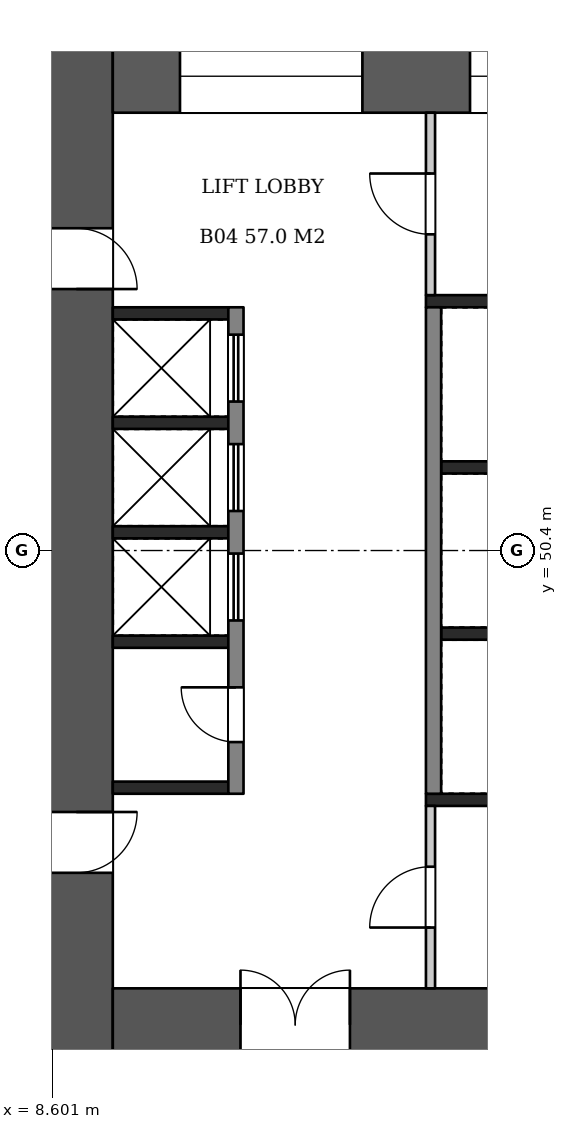
"""IFC4 building model, lengths in metres.
Left out: names, types, materials, properties, quantities, classifications, styles, units other than length and angle.
Written with IfcOpenShell. Run it as: python <this file> out.ifc"""

import sys

from ifc_helpers import new_model, si_unit, direction, frame, frame_2d, origin, place, context, subcontext, project, spatial, rectangle, extrude, element, fill, save


model = new_model("IFC4")
c1 = context("Model", 3, precision=1e-05, world=origin(), true_north=direction((0.0, 1.0)))
c2 = subcontext(c1, "Body", "Model", "MODEL_VIEW")
j1 = project(units=[si_unit("LENGTHUNIT", "METRE"), si_unit("PLANEANGLEUNIT", "RADIAN")], contexts=[c1])
p1 = place(None, origin())
s1 = spatial("IfcSite", under=j1, at=p1, CompositionType="ELEMENT")
p2 = place(p1, origin())
s2 = spatial("IfcBuilding", under=s1, at=p2, CompositionType="ELEMENT")
p3 = place(p2, frame((0.0, 0.0, 25.2)))
s3 = spatial("IfcBuildingStorey", under=s2, at=p3, CompositionType="ELEMENT", Elevation=25.2)
p4 = place(p3, frame((9.0, 58.8, 0.0), z_axis=(0.0, 0.0, 1.0), x_axis=(0.0, -1.0, 0.0)))
e1 = element("IfcWall", 1, at=p4, inside=s3, PredefinedType="SHEAR", context=c2, shape_type="SweptSolid", body=[
    extrude(rectangle(XDim=16.8, YDim=1.2, at=frame_2d((8.4, 0.0))), origin(), (0.0, 0.0, 1.0), 3.22),
])
p5 = place(p4, frame((3.1, 0.0, 0.0)))
e2 = element("IfcOpeningElement", 2, at=p5, cuts=e1, PredefinedType="OPENING", context=c2, shape_type="SweptSolid", body=[
    extrude(rectangle(XDim=1.0, YDim=2.1, at=frame_2d((0.5, 1.05))), frame((0.0, 0.61, 0.0), z_axis=(0.0, -1.0, 0.0), x_axis=(1.0, 0.0, 0.0)), (0.0, 0.0, 1.0), 1.22),
])
p6 = place(p4, frame((12.7, 0.0, 0.0)))
e3 = element("IfcOpeningElement", 3, at=p6, cuts=e1, PredefinedType="OPENING", context=c2, shape_type="SweptSolid", body=[
    extrude(rectangle(XDim=1.0, YDim=2.1, at=frame_2d((0.5, 1.05))), frame((0.0, 0.61, 0.0), z_axis=(0.0, -1.0, 0.0), x_axis=(1.0, 0.0, 0.0)), (0.0, 0.0, 1.0), 1.22),
])
p7 = place(p3, frame((9.6, 58.2, 0.0), z_axis=(0.0, 0.0, 1.0), x_axis=(1.0, 0.0, 0.0)))
e4 = element("IfcWall", 4, at=p7, inside=s3, PredefinedType="SHEAR", context=c2, shape_type="SweptSolid", body=[
    extrude(rectangle(XDim=14.4, YDim=1.2, at=frame_2d((7.2, 0.0))), origin(), (0.0, 0.0, 1.0), 3.22),
])
p8 = place(p7, frame((1.105, 0.0, 0.6)))
e5 = element("IfcOpeningElement", 5, at=p8, cuts=e4, PredefinedType="OPENING", context=c2, shape_type="SweptSolid", body=[
    extrude(rectangle(XDim=3.0, YDim=2.1, at=frame_2d((1.5, 1.05))), frame((0.0, 0.61, 0.0), z_axis=(0.0, -1.0, 0.0), x_axis=(1.0, 0.0, 0.0)), (0.0, 0.0, 1.0), 1.22),
])
p9 = place(p7, frame((5.875, 0.0, 0.6)))
e6 = element("IfcOpeningElement", 6, at=p9, cuts=e4, PredefinedType="OPENING", context=c2, shape_type="SweptSolid", body=[
    extrude(rectangle(XDim=2.4, YDim=2.1, at=frame_2d((1.2, 1.05))), frame((0.0, 0.61, 0.0), z_axis=(0.0, -1.0, 0.0), x_axis=(1.0, 0.0, 0.0)), (0.0, 0.0, 1.0), 1.22),
])
p10 = place(p7, frame((9.993, 0.0, 0.5)))
e7 = element("IfcOpeningElement", 7, at=p10, cuts=e4, PredefinedType="OPENING", context=c2, shape_type="SweptSolid", body=[
    extrude(rectangle(XDim=1.2, YDim=2.4, at=frame_2d((0.6, 1.2))), frame((0.0, 0.61, 0.0), z_axis=(0.0, -1.0, 0.0), x_axis=(1.0, 0.0, 0.0)), (0.0, 0.0, 1.0), 1.22),
])
p11 = place(p7, frame((12.197, 0.0, 0.5)))
e8 = element("IfcOpeningElement", 8, at=p11, cuts=e4, PredefinedType="OPENING", context=c2, shape_type="SweptSolid", body=[
    extrude(rectangle(XDim=1.2, YDim=2.4, at=frame_2d((0.6, 1.2))), frame((0.0, 0.61, 0.0), z_axis=(0.0, -1.0, 0.0), x_axis=(1.0, 0.0, 0.0)), (0.0, 0.0, 1.0), 1.22),
])
p12 = place(p3, frame((9.6, 42.6, 0.0), z_axis=(0.0, 0.0, 1.0), x_axis=(1.0, 0.0, 0.0)))
e9 = element("IfcWall", 9, at=p12, inside=s3, PredefinedType="SHEAR", context=c2, shape_type="SweptSolid", body=[
    extrude(rectangle(XDim=14.4, YDim=1.2, at=frame_2d((7.2, 0.0))), origin(), (0.0, 0.0, 1.0), 3.22),
])
p13 = place(p12, frame((2.1, 0.0, 0.0)))
e10 = element("IfcOpeningElement", 10, at=p13, cuts=e9, PredefinedType="OPENING", context=c2, shape_type="SweptSolid", body=[
    extrude(rectangle(XDim=1.8, YDim=2.1, at=frame_2d((0.9, 1.05))), frame((0.0, 0.61, 0.0), z_axis=(0.0, -1.0, 0.0), x_axis=(1.0, 0.0, 0.0)), (0.0, 0.0, 1.0), 1.22),
])
for number, where, z_axis, x_axis in (
    (11, (9.6, 54.3, 0.0), (0.0, 0.0, 1.0), (1.0, 0.0, 0.0)),
    (12, (9.6, 52.5, 0.0), (0.0, 0.0, 1.0), (1.0, 0.0, 0.0)),
    (13, (9.6, 50.7, 0.0), (0.0, 0.0, 1.0), (1.0, 0.0, 0.0)),
    (14, (9.6, 48.9, 0.0), (0.0, 0.0, 1.0), (1.0, 0.0, 0.0)),
    (15, (9.6, 46.5, 0.0), (0.0, 0.0, 1.0), (1.0, 0.0, 0.0)),
):
    element("IfcWall", number, at=place(p3, frame(where, z_axis=z_axis, x_axis=x_axis)), inside=s3, PredefinedType="SHEAR", context=c2, shape_type="SweptSolid", body=[
        extrude(rectangle(XDim=1.9, YDim=0.2, at=frame_2d((0.95, 0.0))), origin(), (0.0, 0.0, 1.0), 3.22),
    ])
p14 = place(p3, frame((11.625, 54.4, 0.0), z_axis=(0.0, 0.0, 1.0), x_axis=(0.0, -1.0, 0.0)))
e16 = element("IfcWall", 16, at=p14, inside=s3, PredefinedType="SHEAR", context=c2, shape_type="SweptSolid", body=[
    extrude(rectangle(XDim=8.0, YDim=0.25, at=frame_2d((4.0, 0.0))), origin(), (0.0, 0.0, 1.0), 3.22),
])
p15 = place(p14, frame((0.45, 0.0, 0.0)))
e17 = element("IfcOpeningElement", 17, at=p15, cuts=e16, PredefinedType="OPENING", context=c2, shape_type="SweptSolid", body=[
    extrude(rectangle(XDim=1.1, YDim=2.1, at=frame_2d((0.55, 1.05))), frame((0.0, 0.135, 0.0), z_axis=(0.0, -1.0, 0.0), x_axis=(1.0, 0.0, 0.0)), (0.0, 0.0, 1.0), 0.27),
])
p16 = place(p14, frame((2.25, 0.0, 0.0)))
e18 = element("IfcOpeningElement", 18, at=p16, cuts=e16, PredefinedType="OPENING", context=c2, shape_type="SweptSolid", body=[
    extrude(rectangle(XDim=1.1, YDim=2.1, at=frame_2d((0.55, 1.05))), frame((0.0, 0.135, 0.0), z_axis=(0.0, -1.0, 0.0), x_axis=(1.0, 0.0, 0.0)), (0.0, 0.0, 1.0), 0.27),
])
p17 = place(p14, frame((4.05, 0.0, 0.0)))
e19 = element("IfcOpeningElement", 19, at=p17, cuts=e16, PredefinedType="OPENING", context=c2, shape_type="SweptSolid", body=[
    extrude(rectangle(XDim=1.1, YDim=2.1, at=frame_2d((0.55, 1.05))), frame((0.0, 0.135, 0.0), z_axis=(0.0, -1.0, 0.0), x_axis=(1.0, 0.0, 0.0)), (0.0, 0.0, 1.0), 0.27),
])
p18 = place(p14, frame((6.25, 0.0, 0.0)))
e20 = element("IfcOpeningElement", 20, at=p18, cuts=e16, PredefinedType="OPENING", context=c2, shape_type="SweptSolid", body=[
    extrude(rectangle(XDim=0.9, YDim=2.1, at=frame_2d((0.45, 1.05))), frame((0.0, 0.135, 0.0), z_axis=(0.0, -1.0, 0.0), x_axis=(1.0, 0.0, 0.0)), (0.0, 0.0, 1.0), 0.27),
])
for number, where, z_axis, x_axis in (
    (21, (15.0, 51.767, 0.0), (0.0, 0.0, 1.0), (1.0, 0.0, 0.0)),
    (22, (15.0, 49.033, 0.0), (0.0, 0.0, 1.0), (1.0, 0.0, 0.0)),
):
    element("IfcWall", number, at=place(p3, frame(where, z_axis=z_axis, x_axis=x_axis)), inside=s3, PredefinedType="SHEAR", context=c2, shape_type="SweptSolid", body=[
        extrude(rectangle(XDim=1.9, YDim=0.2, at=frame_2d((0.95, 0.0))), origin(), (0.0, 0.0, 1.0), 3.22),
    ])
p19 = place(p3, frame((14.875, 54.4, 0.0), z_axis=(0.0, 0.0, 1.0), x_axis=(0.0, -1.0, 0.0)))
e23 = element("IfcWall", 23, at=p19, inside=s3, PredefinedType="SHEAR", context=c2, shape_type="SweptSolid", body=[
    extrude(rectangle(XDim=8.0, YDim=0.25, at=frame_2d((4.0, 0.0))), origin(), (0.0, 0.0, 1.0), 3.22),
])
p20 = place(p3, frame((14.75, 54.5, 0.0), z_axis=(0.0, 0.0, 1.0), x_axis=(1.0, 0.0, 0.0)))
e24 = element("IfcWall", 24, at=p20, inside=s3, PredefinedType="SHEAR", context=c2, shape_type="SweptSolid", body=[
    extrude(rectangle(XDim=2.4, YDim=0.2, at=frame_2d((1.2, 0.0))), origin(), (0.0, 0.0, 1.0), 3.22),
])
p21 = place(p3, frame((14.825, 57.6, 0.0), z_axis=(0.0, 0.0, 1.0), x_axis=(0.0, -1.0, 0.0)))
e25 = element("IfcWall", 25, at=p21, inside=s3, PredefinedType="PARTITIONING", context=c2, shape_type="SweptSolid", body=[
    extrude(rectangle(XDim=3.0, YDim=0.15, at=frame_2d((1.5, 0.0))), origin(), (0.0, 0.0, 1.0), 3.22),
])
p22 = place(p21, frame((1.0, 0.0, 0.0)))
e26 = element("IfcOpeningElement", 26, at=p22, cuts=e25, PredefinedType="OPENING", context=c2, shape_type="SweptSolid", body=[
    extrude(rectangle(XDim=1.0, YDim=2.1, at=frame_2d((0.5, 1.05))), frame((0.0, 0.085, 0.0), z_axis=(0.0, -1.0, 0.0), x_axis=(1.0, 0.0, 0.0)), (0.0, 0.0, 1.0), 0.17),
])
p23 = place(p3, frame((14.75, 46.3, 0.0), z_axis=(0.0, 0.0, 1.0), x_axis=(1.0, 0.0, 0.0)))
e27 = element("IfcWall", 27, at=p23, inside=s3, PredefinedType="SHEAR", context=c2, shape_type="SweptSolid", body=[
    extrude(rectangle(XDim=2.4, YDim=0.2, at=frame_2d((1.2, 0.0))), origin(), (0.0, 0.0, 1.0), 3.22),
])
p24 = place(p3, frame((14.825, 46.2, 0.0), z_axis=(0.0, 0.0, 1.0), x_axis=(0.0, -1.0, 0.0)))
e28 = element("IfcWall", 28, at=p24, inside=s3, PredefinedType="PARTITIONING", context=c2, shape_type="SweptSolid", body=[
    extrude(rectangle(XDim=3.0, YDim=0.15, at=frame_2d((1.5, 0.0))), origin(), (0.0, 0.0, 1.0), 3.22),
])
p25 = place(p24, frame((1.0, 0.0, 0.0)))
e29 = element("IfcOpeningElement", 29, at=p25, cuts=e28, PredefinedType="OPENING", context=c2, shape_type="SweptSolid", body=[
    extrude(rectangle(XDim=1.0, YDim=2.1, at=frame_2d((0.5, 1.05))), frame((0.0, 0.085, 0.0), z_axis=(0.0, -1.0, 0.0), x_axis=(1.0, 0.0, 0.0)), (0.0, 0.0, 1.0), 0.17),
])
p26 = place(p5, origin())
e30 = element("IfcDoor", 30, at=p26, inside=s3, OperationType="SINGLE_SWING_RIGHT", PredefinedType="DOOR", context=c2, shape_type="SweptSolid", body=[
    extrude(rectangle(XDim=1.0, YDim=2.1, at=frame_2d((0.5, 1.05))), frame((0.0, 0.025, 0.0), z_axis=(0.0, -1.0, 0.0), x_axis=(1.0, 0.0, 0.0)), (0.0, 0.0, 1.0), 0.05),
])
fill(e2, e30)
p27 = place(p6, origin())
e31 = element("IfcDoor", 31, at=p27, inside=s3, OperationType="SINGLE_SWING_LEFT", PredefinedType="DOOR", context=c2, shape_type="SweptSolid", body=[
    extrude(rectangle(XDim=1.0, YDim=2.1, at=frame_2d((0.5, 1.05))), frame((0.0, 0.025, 0.0), z_axis=(0.0, -1.0, 0.0), x_axis=(1.0, 0.0, 0.0)), (0.0, 0.0, 1.0), 0.05),
])
fill(e3, e31)
p28 = place(p13, origin())
e32 = element("IfcDoor", 32, at=p28, inside=s3, OperationType="DOUBLE_DOOR_SINGLE_SWING", PredefinedType="DOOR", context=c2, shape_type="SweptSolid", body=[
    extrude(rectangle(XDim=1.8, YDim=2.1, at=frame_2d((0.9, 1.05))), frame((0.0, 0.025, 0.0), z_axis=(0.0, -1.0, 0.0), x_axis=(1.0, 0.0, 0.0)), (0.0, 0.0, 1.0), 0.05),
])
fill(e10, e32)
p29 = place(p15, origin())
e33 = element("IfcDoor", 33, at=p29, inside=s3, OperationType="DOUBLE_DOOR_SLIDING", PredefinedType="DOOR", context=c2, shape_type="SweptSolid", body=[
    extrude(rectangle(XDim=1.1, YDim=2.1, at=frame_2d((0.55, 1.05))), frame((0.0, 0.025, 0.0), z_axis=(0.0, -1.0, 0.0), x_axis=(1.0, 0.0, 0.0)), (0.0, 0.0, 1.0), 0.05),
])
fill(e17, e33)
p30 = place(p16, origin())
e34 = element("IfcDoor", 34, at=p30, inside=s3, OperationType="DOUBLE_DOOR_SLIDING", PredefinedType="DOOR", context=c2, shape_type="SweptSolid", body=[
    extrude(rectangle(XDim=1.1, YDim=2.1, at=frame_2d((0.55, 1.05))), frame((0.0, 0.025, 0.0), z_axis=(0.0, -1.0, 0.0), x_axis=(1.0, 0.0, 0.0)), (0.0, 0.0, 1.0), 0.05),
])
fill(e18, e34)
p31 = place(p17, origin())
e35 = element("IfcDoor", 35, at=p31, inside=s3, OperationType="DOUBLE_DOOR_SLIDING", PredefinedType="DOOR", context=c2, shape_type="SweptSolid", body=[
    extrude(rectangle(XDim=1.1, YDim=2.1, at=frame_2d((0.55, 1.05))), frame((0.0, 0.025, 0.0), z_axis=(0.0, -1.0, 0.0), x_axis=(1.0, 0.0, 0.0)), (0.0, 0.0, 1.0), 0.05),
])
fill(e19, e35)
p32 = place(p18, frame((0.9, 0.0, 0.0), z_axis=(0.0, 0.0, 1.0), x_axis=(-1.0, 0.0, 0.0)))
e36 = element("IfcDoor", 36, at=p32, inside=s3, OperationType="SINGLE_SWING_RIGHT", PredefinedType="DOOR", context=c2, shape_type="SweptSolid", body=[
    extrude(rectangle(XDim=0.9, YDim=2.1, at=frame_2d((0.45, 1.05))), frame((0.0, 0.025, 0.0), z_axis=(0.0, -1.0, 0.0), x_axis=(1.0, 0.0, 0.0)), (0.0, 0.0, 1.0), 0.05),
])
fill(e20, e36)
p33 = place(p22, frame((1.0, 0.0, 0.0), z_axis=(0.0, 0.0, 1.0), x_axis=(-1.0, 0.0, 0.0)))
e37 = element("IfcDoor", 37, at=p33, inside=s3, OperationType="SINGLE_SWING_RIGHT", PredefinedType="DOOR", context=c2, shape_type="SweptSolid", body=[
    extrude(rectangle(XDim=1.0, YDim=2.1, at=frame_2d((0.5, 1.05))), frame((0.0, 0.025, 0.0), z_axis=(0.0, -1.0, 0.0), x_axis=(1.0, 0.0, 0.0)), (0.0, 0.0, 1.0), 0.05),
])
fill(e26, e37)
p34 = place(p25, frame((1.0, 0.0, 0.0), z_axis=(0.0, 0.0, 1.0), x_axis=(-1.0, 0.0, 0.0)))
e38 = element("IfcDoor", 38, at=p34, inside=s3, OperationType="SINGLE_SWING_LEFT", PredefinedType="DOOR", context=c2, shape_type="SweptSolid", body=[
    extrude(rectangle(XDim=1.0, YDim=2.1, at=frame_2d((0.5, 1.05))), frame((0.0, 0.025, 0.0), z_axis=(0.0, -1.0, 0.0), x_axis=(1.0, 0.0, 0.0)), (0.0, 0.0, 1.0), 0.05),
])
fill(e29, e38)
p35 = place(p8, origin())
e39 = element("IfcWindow", 39, at=p35, inside=s3, PartitioningType="SINGLE_PANEL", PredefinedType="WINDOW", context=c2, shape_type="SweptSolid", body=[
    extrude(rectangle(XDim=3.0, YDim=2.1, at=frame_2d((1.5, 1.05))), frame((0.0, 0.03, 0.0), z_axis=(0.0, -1.0, 0.0), x_axis=(1.0, 0.0, 0.0)), (0.0, 0.0, 1.0), 0.06),
])
fill(e5, e39)
p36 = place(p9, origin())
e40 = element("IfcWindow", 40, at=p36, inside=s3, PartitioningType="SINGLE_PANEL", PredefinedType="WINDOW", context=c2, shape_type="SweptSolid", body=[
    extrude(rectangle(XDim=2.4, YDim=2.1, at=frame_2d((1.2, 1.05))), frame((0.0, 0.03, 0.0), z_axis=(0.0, -1.0, 0.0), x_axis=(1.0, 0.0, 0.0)), (0.0, 0.0, 1.0), 0.06),
])
fill(e6, e40)
save(model, sys.argv[1])
